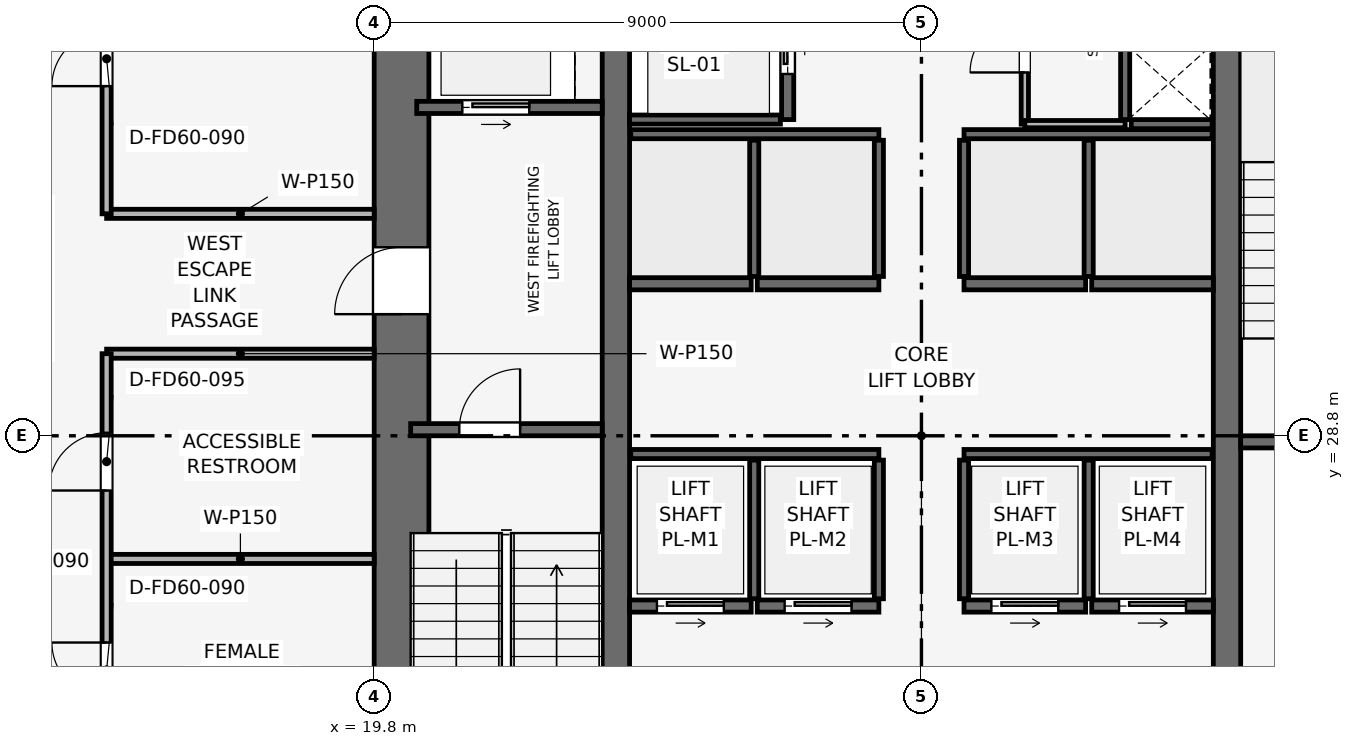
"""IFC4 building model, lengths in metres.
Left out: names, types, materials, properties, quantities, classifications, styles, units other than length and angle.
Written with IfcOpenShell. Run it as: python <this file> out.ifc"""

import sys

from ifc_helpers import new_model, si_unit, direction, frame, frame_2d, origin, place, context, subcontext, project, spatial, rectangle, extrude, element, fill, save


model = new_model("IFC4")
c1 = context("Model", 3, precision=1e-05, world=origin(), true_north=direction((0.0, 1.0)))
c2 = subcontext(c1, "Body", "Model", "MODEL_VIEW")
j1 = project(units=[si_unit("LENGTHUNIT", "METRE"), si_unit("PLANEANGLEUNIT", "RADIAN")], contexts=[c1])
p1 = place(None, origin())
s1 = spatial("IfcSite", under=j1, at=p1, CompositionType="ELEMENT")
p2 = place(p1, origin())
s2 = spatial("IfcBuilding", under=s1, at=p2, CompositionType="ELEMENT")
p3 = place(p2, frame((0.0, 0.0, 160.8)))
s3 = spatial("IfcBuildingStorey", under=s2, at=p3, CompositionType="ELEMENT", Elevation=160.8)
p4 = place(p3, frame((20.25, 20.7, 0.0), z_axis=(0.0, 0.0, 1.0), x_axis=(0.0, 1.0, 0.0)))
e1 = element("IfcWall", 1, at=p4, inside=s3, PredefinedType="SHEAR", context=c2, shape_type="SweptSolid", body=[
    extrude(rectangle(XDim=16.2, YDim=0.9, at=frame_2d((8.1, 0.0))), origin(), (0.0, 0.0, 1.0), 3.75),
])
p5 = place(p4, frame((10.1, 0.0, 0.0)))
e2 = element("IfcOpeningElement", 2, at=p5, cuts=e1, PredefinedType="OPENING", context=c2, shape_type="SweptSolid", body=[
    extrude(rectangle(XDim=1.1, YDim=2.15, at=frame_2d((0.55, 1.075))), frame((0.0, 0.46, 0.0), z_axis=(0.0, -1.0, 0.0), x_axis=(1.0, 0.0, 0.0)), (0.0, 0.0, 1.0), 0.92),
])
for number, where, z_axis, x_axis in (
    (3, (23.775, 20.7, 0.0), (0.0, 0.0, 1.0), (0.0, 1.0, 0.0)),
    (4, (33.825, 20.7, 0.0), (0.0, 0.0, 1.0), (0.0, 1.0, 0.0)),
):
    element("IfcWall", number, at=place(p3, frame(where, z_axis=z_axis, x_axis=x_axis)), inside=s3, PredefinedType="SHEAR", context=c2, shape_type="SweptSolid", body=[
        extrude(rectangle(XDim=16.2, YDim=0.45, at=frame_2d((8.1, 0.0))), origin(), (0.0, 0.0, 1.0), 3.75),
    ])
p6 = place(p3, frame((20.4, 28.9, 0.0), z_axis=(0.0, 0.0, 1.0), x_axis=(1.0, 0.0, 0.0)))
e5 = element("IfcWall", 5, at=p6, inside=s3, PredefinedType="SHEAR", context=c2, shape_type="SweptSolid", body=[
    extrude(rectangle(XDim=3.15, YDim=0.2, at=frame_2d((1.575, 0.0))), origin(), (0.0, 0.0, 1.0), 3.495),
])
p7 = place(p6, frame((0.8, 0.0, 0.0)))
e6 = element("IfcOpeningElement", 6, at=p7, cuts=e5, PredefinedType="OPENING", context=c2, shape_type="SweptSolid", body=[
    extrude(rectangle(XDim=1.0, YDim=2.1, at=frame_2d((0.5, 1.05))), frame((0.0, 0.11, 0.0), z_axis=(0.0, -1.0, 0.0), x_axis=(1.0, 0.0, 0.0)), (0.0, 0.0, 1.0), 0.22),
])
p8 = place(p3, frame((34.05, 28.7, 0.0), z_axis=(0.0, 0.0, 1.0), x_axis=(1.0, 0.0, 0.0)))
e7 = element("IfcWall", 7, at=p8, inside=s3, PredefinedType="SHEAR", context=c2, shape_type="SweptSolid", body=[
    extrude(rectangle(XDim=3.15, YDim=0.2, at=frame_2d((1.575, 0.0))), origin(), (0.0, 0.0, 1.0), 3.495),
])
p9 = place(p8, frame((0.8, 0.0, 0.0)))
e8 = element("IfcOpeningElement", 8, at=p9, cuts=e7, PredefinedType="OPENING", context=c2, shape_type="SweptSolid", body=[
    extrude(rectangle(XDim=1.0, YDim=2.1, at=frame_2d((0.5, 1.05))), frame((0.0, 0.11, 0.0), z_axis=(0.0, -1.0, 0.0), x_axis=(1.0, 0.0, 0.0)), (0.0, 0.0, 1.0), 0.22),
])
p10 = place(p3, frame((32.15, 34.0, 0.0), z_axis=(0.0, 0.0, 1.0), x_axis=(0.0, 1.0, 0.0)))
e9 = element("IfcWall", 9, at=p10, inside=s3, PredefinedType="SHEAR", context=c2, shape_type="SweptSolid", body=[
    extrude(rectangle(XDim=2.9, YDim=0.15, at=frame_2d((1.45, 0.0))), origin(), (0.0, 0.0, 1.0), 3.495),
])
p11 = place(p3, frame((32.25, 33.925, 0.0), z_axis=(0.0, 0.0, 1.0), x_axis=(1.0, 0.0, 0.0)))
e10 = element("IfcWall", 10, at=p11, inside=s3, PredefinedType="SHEAR", context=c2, shape_type="SweptSolid", body=[
    extrude(rectangle(XDim=1.33, YDim=0.15, at=frame_2d((0.665, 0.0))), origin(), (0.0, 0.0, 1.0), 3.495),
])
p12 = place(p3, frame((20.5, 34.2, 0.0), z_axis=(0.0, 0.0, 1.0), x_axis=(1.0, 0.0, 0.0)))
e11 = element("IfcWall", 11, at=p12, inside=s3, PredefinedType="SHEAR", context=c2, shape_type="SweptSolid", body=[
    extrude(rectangle(XDim=3.05, YDim=0.2, at=frame_2d((1.525, 0.0))), origin(), (0.0, 0.0, 1.0), 3.495),
])
p13 = place(p12, frame((0.75, 0.0, 0.0)))
e12 = element("IfcOpeningElement", 12, at=p13, cuts=e11, PredefinedType="OPENING", context=c2, shape_type="SweptSolid", body=[
    extrude(rectangle(XDim=1.1, YDim=2.15, at=frame_2d((0.55, 1.075))), frame((0.0, 0.11, 0.0), z_axis=(0.0, -1.0, 0.0), x_axis=(1.0, 0.0, 0.0)), (0.0, 0.0, 1.0), 0.22),
])
p14 = place(p3, frame((26.6, 34.0, 0.0), z_axis=(0.0, 0.0, 1.0), x_axis=(0.0, 1.0, 0.0)))
e13 = element("IfcWall", 13, at=p14, inside=s3, PredefinedType="SHEAR", context=c2, shape_type="SweptSolid", body=[
    extrude(rectangle(XDim=2.9, YDim=0.2, at=frame_2d((1.45, 0.0))), origin(), (0.0, 0.0, 1.0), 3.495),
])
p15 = place(p14, frame((0.75, 0.0, 0.0)))
e14 = element("IfcOpeningElement", 14, at=p15, cuts=e13, PredefinedType="OPENING", context=c2, shape_type="SweptSolid", body=[
    extrude(rectangle(XDim=1.1, YDim=2.15, at=frame_2d((0.55, 1.075))), frame((0.0, 0.11, 0.0), z_axis=(0.0, -1.0, 0.0), x_axis=(1.0, 0.0, 0.0)), (0.0, 0.0, 1.0), 0.22),
])
p16 = place(p3, frame((24.0, 34.0, 0.0), z_axis=(0.0, 0.0, 1.0), x_axis=(1.0, 0.0, 0.0)))
e15 = element("IfcWall", 15, at=p16, inside=s3, PredefinedType="SHEAR", context=c2, shape_type="SweptSolid", body=[
    extrude(rectangle(XDim=2.48, YDim=0.15, at=frame_2d((1.24, 0.0))), origin(), (0.0, 0.0, 1.0), 3.495),
])
p17 = place(p3, frame((24.0, 26.0, 0.0), z_axis=(0.0, 0.0, 1.0), x_axis=(1.0, 0.0, 0.0)))
e16 = element("IfcWall", 16, at=p17, inside=s3, PredefinedType="SHEAR", context=c2, shape_type="SweptSolid", body=[
    extrude(rectangle(XDim=2.0, YDim=0.2, at=frame_2d((1.0, 0.0))), origin(), (0.0, 0.0, 1.0), 3.495),
])
p18 = place(p17, frame((0.45, 0.0, 0.0)))
e17 = element("IfcOpeningElement", 17, at=p18, cuts=e16, PredefinedType="OPENING", context=c2, shape_type="SweptSolid", body=[
    extrude(rectangle(XDim=1.1, YDim=2.15, at=frame_2d((0.55, 1.075))), frame((0.0, 0.11, 0.0), z_axis=(0.0, -1.0, 0.0), x_axis=(1.0, 0.0, 0.0)), (0.0, 0.0, 1.0), 0.22),
])
p19 = place(p3, frame((26.1, 26.0, 0.0), z_axis=(0.0, 0.0, 1.0), x_axis=(1.0, 0.0, 0.0)))
e18 = element("IfcWall", 18, at=p19, inside=s3, PredefinedType="SHEAR", context=c2, shape_type="SweptSolid", body=[
    extrude(rectangle(XDim=2.0, YDim=0.2, at=frame_2d((1.0, 0.0))), origin(), (0.0, 0.0, 1.0), 3.495),
])
p20 = place(p19, frame((0.45, 0.0, 0.0)))
e19 = element("IfcOpeningElement", 19, at=p20, cuts=e18, PredefinedType="OPENING", context=c2, shape_type="SweptSolid", body=[
    extrude(rectangle(XDim=1.1, YDim=2.15, at=frame_2d((0.55, 1.075))), frame((0.0, 0.11, 0.0), z_axis=(0.0, -1.0, 0.0), x_axis=(1.0, 0.0, 0.0)), (0.0, 0.0, 1.0), 0.22),
])
p21 = place(p3, frame((29.5, 26.0, 0.0), z_axis=(0.0, 0.0, 1.0), x_axis=(1.0, 0.0, 0.0)))
e20 = element("IfcWall", 20, at=p21, inside=s3, PredefinedType="SHEAR", context=c2, shape_type="SweptSolid", body=[
    extrude(rectangle(XDim=2.0, YDim=0.2, at=frame_2d((1.0, 0.0))), origin(), (0.0, 0.0, 1.0), 3.495),
])
p22 = place(p21, frame((0.45, 0.0, 0.0)))
e21 = element("IfcOpeningElement", 21, at=p22, cuts=e20, PredefinedType="OPENING", context=c2, shape_type="SweptSolid", body=[
    extrude(rectangle(XDim=1.1, YDim=2.15, at=frame_2d((0.55, 1.075))), frame((0.0, 0.11, 0.0), z_axis=(0.0, -1.0, 0.0), x_axis=(1.0, 0.0, 0.0)), (0.0, 0.0, 1.0), 0.22),
])
p23 = place(p3, frame((31.6, 26.0, 0.0), z_axis=(0.0, 0.0, 1.0), x_axis=(1.0, 0.0, 0.0)))
e22 = element("IfcWall", 22, at=p23, inside=s3, PredefinedType="SHEAR", context=c2, shape_type="SweptSolid", body=[
    extrude(rectangle(XDim=2.0, YDim=0.2, at=frame_2d((1.0, 0.0))), origin(), (0.0, 0.0, 1.0), 3.495),
])
p24 = place(p23, frame((0.45, 0.0, 0.0)))
e23 = element("IfcOpeningElement", 23, at=p24, cuts=e22, PredefinedType="OPENING", context=c2, shape_type="SweptSolid", body=[
    extrude(rectangle(XDim=1.1, YDim=2.15, at=frame_2d((0.55, 1.075))), frame((0.0, 0.11, 0.0), z_axis=(0.0, -1.0, 0.0), x_axis=(1.0, 0.0, 0.0)), (0.0, 0.0, 1.0), 0.22),
])
for number, where, z_axis, x_axis in (
    (24, (24.0, 31.3, 0.0), (0.0, 0.0, 1.0), (1.0, 0.0, 0.0)),
    (25, (26.1, 31.3, 0.0), (0.0, 0.0, 1.0), (1.0, 0.0, 0.0)),
    (26, (29.5, 31.3, 0.0), (0.0, 0.0, 1.0), (1.0, 0.0, 0.0)),
    (27, (31.6, 31.3, 0.0), (0.0, 0.0, 1.0), (1.0, 0.0, 0.0)),
):
    element("IfcWall", number, at=place(p3, frame(where, z_axis=z_axis, x_axis=x_axis)), inside=s3, PredefinedType="SHEAR", context=c2, shape_type="SweptSolid", body=[
        extrude(rectangle(XDim=2.0, YDim=0.2, at=frame_2d((1.0, 0.0))), origin(), (0.0, 0.0, 1.0), 3.495),
    ])
for number, where, z_axis, x_axis in (
    (28, (24.02, 28.5, 0.0), (0.0, 0.0, 1.0), (1.0, 0.0, 0.0)),
    (29, (29.5, 28.5, 0.0), (0.0, 0.0, 1.0), (1.0, 0.0, 0.0)),
):
    element("IfcWall", number, at=place(p3, frame(where, z_axis=z_axis, x_axis=x_axis)), inside=s3, PredefinedType="SHEAR", context=c2, shape_type="SweptSolid", body=[
        extrude(rectangle(XDim=4.08, YDim=0.15, at=frame_2d((2.04, 0.0))), origin(), (0.0, 0.0, 1.0), 3.495),
    ])
for number, where, z_axis, x_axis in (
    (30, (26.05, 26.12, 0.0), (0.0, 0.0, 1.0), (0.0, 1.0, 0.0)),
    (31, (28.1, 26.12, 0.0), (0.0, 0.0, 1.0), (0.0, 1.0, 0.0)),
    (32, (29.5, 26.12, 0.0), (0.0, 0.0, 1.0), (0.0, 1.0, 0.0)),
    (33, (31.55, 26.12, 0.0), (0.0, 0.0, 1.0), (0.0, 1.0, 0.0)),
):
    element("IfcWall", number, at=place(p3, frame(where, z_axis=z_axis, x_axis=x_axis)), inside=s3, PredefinedType="SHEAR", context=c2, shape_type="SweptSolid", body=[
        extrude(rectangle(XDim=2.28, YDim=0.15, at=frame_2d((1.14, 0.0))), origin(), (0.0, 0.0, 1.0), 3.495),
    ])
for number, where, z_axis, x_axis in (
    (34, (24.02, 33.76, 0.0), (0.0, 0.0, 1.0), (1.0, 0.0, 0.0)),
    (35, (29.5, 33.76, 0.0), (0.0, 0.0, 1.0), (1.0, 0.0, 0.0)),
):
    element("IfcWall", number, at=place(p3, frame(where, z_axis=z_axis, x_axis=x_axis)), inside=s3, PredefinedType="SHEAR", context=c2, shape_type="SweptSolid", body=[
        extrude(rectangle(XDim=4.08, YDim=0.15, at=frame_2d((2.04, 0.0))), origin(), (0.0, 0.0, 1.0), 3.495),
    ])
for number, where, z_axis, x_axis in (
    (36, (26.05, 31.42, 0.0), (0.0, 0.0, 1.0), (0.0, 1.0, 0.0)),
    (37, (28.1, 31.42, 0.0), (0.0, 0.0, 1.0), (0.0, 1.0, 0.0)),
    (38, (29.5, 31.42, 0.0), (0.0, 0.0, 1.0), (0.0, 1.0, 0.0)),
    (39, (31.55, 31.42, 0.0), (0.0, 0.0, 1.0), (0.0, 1.0, 0.0)),
):
    element("IfcWall", number, at=place(p3, frame(where, z_axis=z_axis, x_axis=x_axis)), inside=s3, PredefinedType="SHEAR", context=c2, shape_type="SweptSolid", body=[
        extrude(rectangle(XDim=2.24, YDim=0.15, at=frame_2d((1.12, 0.0))), origin(), (0.0, 0.0, 1.0), 3.495),
    ])
p25 = place(p3, frame((30.5, 33.925, 0.0), z_axis=(0.0, 0.0, 1.0), x_axis=(0.0, 1.0, 0.0)))
e40 = element("IfcWall", 40, at=p25, inside=s3, PredefinedType="PARTITIONING", context=c2, shape_type="SweptSolid", body=[
    extrude(rectangle(XDim=2.975, YDim=0.12, at=frame_2d((1.487, 0.0))), origin(), (0.0, 0.0, 1.0), 3.495),
])
p26 = place(p25, frame((0.85, 0.0, 0.0)))
e41 = element("IfcOpeningElement", 41, at=p26, cuts=e40, PredefinedType="OPENING", context=c2, shape_type="SweptSolid", body=[
    extrude(rectangle(XDim=0.9, YDim=2.1, at=frame_2d((0.45, 1.05))), frame((0.0, 0.07, 0.0), z_axis=(0.0, -1.0, 0.0), x_axis=(1.0, 0.0, 0.0)), (0.0, 0.0, 1.0), 0.14),
])
p27 = place(p3, frame((30.5, 33.925, 0.0), z_axis=(0.0, 0.0, 1.0), x_axis=(1.0, 0.0, 0.0)))
e42 = element("IfcWall", 42, at=p27, inside=s3, PredefinedType="PARTITIONING", context=c2, shape_type="SweptSolid", body=[
    extrude(rectangle(XDim=1.65, YDim=0.12, at=frame_2d((0.825, 0.0))), origin(), (0.0, 0.0, 1.0), 3.495),
])
for number, where, z_axis, x_axis in (
    (43, (15.4, 26.775, 0.0), (0.0, 0.0, 1.0), (1.0, 0.0, 0.0)),
    (44, (15.4, 30.15, 0.0), (0.0, 0.0, 1.0), (1.0, 0.0, 0.0)),
    (45, (15.4, 32.45, 0.0), (0.0, 0.0, 1.0), (1.0, 0.0, 0.0)),
):
    element("IfcWall", number, at=place(p3, frame(where, z_axis=z_axis, x_axis=x_axis)), inside=s3, PredefinedType="PARTITIONING", context=c2, shape_type="SweptSolid", body=[
        extrude(rectangle(XDim=4.4, YDim=0.15, at=frame_2d((2.2, 0.0))), origin(), (0.0, 0.0, 1.0), 3.495),
    ])
p28 = place(p3, frame((15.4, 19.8, 0.0), z_axis=(0.0, 0.0, 1.0), x_axis=(0.0, 1.0, 0.0)))
e46 = element("IfcWall", 46, at=p28, inside=s3, PredefinedType="PARTITIONING", context=c2, shape_type="SweptSolid", body=[
    extrude(rectangle(XDim=10.35, YDim=0.15, at=frame_2d((5.175, 0.0))), origin(), (0.0, 0.0, 1.0), 3.03),
])
p29 = place(p28, frame((1.2, 0.0, 0.0)))
e47 = element("IfcOpeningElement", 47, at=p29, cuts=e46, PredefinedType="OPENING", context=c2, shape_type="SweptSolid", body=[
    extrude(rectangle(XDim=0.9, YDim=2.1, at=frame_2d((0.45, 1.05))), frame((0.0, 0.085, 0.0), z_axis=(0.0, -1.0, 0.0), x_axis=(1.0, 0.0, 0.0)), (0.0, 0.0, 1.0), 0.17),
])
p30 = place(p28, frame((4.7, 0.0, 0.0)))
e48 = element("IfcOpeningElement", 48, at=p30, cuts=e46, PredefinedType="OPENING", context=c2, shape_type="SweptSolid", body=[
    extrude(rectangle(XDim=0.9, YDim=2.1, at=frame_2d((0.45, 1.05))), frame((0.0, 0.085, 0.0), z_axis=(0.0, -1.0, 0.0), x_axis=(1.0, 0.0, 0.0)), (0.0, 0.0, 1.0), 0.17),
])
p31 = place(p28, frame((8.1, 0.0, 0.0)))
e49 = element("IfcOpeningElement", 49, at=p31, cuts=e46, PredefinedType="OPENING", context=c2, shape_type="SweptSolid", body=[
    extrude(rectangle(XDim=0.95, YDim=2.1, at=frame_2d((0.475, 1.05))), frame((0.0, 0.085, 0.0), z_axis=(0.0, -1.0, 0.0), x_axis=(1.0, 0.0, 0.0)), (0.0, 0.0, 1.0), 0.17),
])
p32 = place(p3, frame((15.4, 32.45, 0.0), z_axis=(0.0, 0.0, 1.0), x_axis=(0.0, 1.0, 0.0)))
e50 = element("IfcWall", 50, at=p32, inside=s3, PredefinedType="PARTITIONING", context=c2, shape_type="SweptSolid", body=[
    extrude(rectangle(XDim=5.35, YDim=0.15, at=frame_2d((2.675, 0.0))), origin(), (0.0, 0.0, 1.0), 3.03),
])
p33 = place(p32, frame((2.1, 0.0, 0.0)))
e51 = element("IfcOpeningElement", 51, at=p33, cuts=e50, PredefinedType="OPENING", context=c2, shape_type="SweptSolid", body=[
    extrude(rectangle(XDim=0.9, YDim=2.1, at=frame_2d((0.45, 1.05))), frame((0.0, 0.085, 0.0), z_axis=(0.0, -1.0, 0.0), x_axis=(1.0, 0.0, 0.0)), (0.0, 0.0, 1.0), 0.17),
])
p34 = place(p7, origin())
e52 = element("IfcDoor", 52, at=p34, inside=s3, OperationType="SINGLE_SWING_RIGHT", PredefinedType="DOOR", context=c2, shape_type="SweptSolid", body=[
    extrude(rectangle(XDim=1.0, YDim=2.1, at=frame_2d((0.5, 1.05))), frame((0.0, 0.025, 0.0), z_axis=(0.0, -1.0, 0.0), x_axis=(1.0, 0.0, 0.0)), (0.0, 0.0, 1.0), 0.05),
])
fill(e6, e52)
p35 = place(p13, origin())
e53 = element("IfcDoor", 53, at=p35, inside=s3, OperationType="SLIDING_TO_RIGHT", PredefinedType="DOOR", context=c2, shape_type="SweptSolid", body=[
    extrude(rectangle(XDim=1.1, YDim=2.15, at=frame_2d((0.55, 1.075))), frame((0.0, 0.025, 0.0), z_axis=(0.0, -1.0, 0.0), x_axis=(1.0, 0.0, 0.0)), (0.0, 0.0, 1.0), 0.05),
])
fill(e12, e53)
p36 = place(p15, origin())
e54 = element("IfcDoor", 54, at=p36, inside=s3, OperationType="SLIDING_TO_RIGHT", PredefinedType="DOOR", context=c2, shape_type="SweptSolid", body=[
    extrude(rectangle(XDim=1.1, YDim=2.15, at=frame_2d((0.55, 1.075))), frame((0.0, 0.025, 0.0), z_axis=(0.0, -1.0, 0.0), x_axis=(1.0, 0.0, 0.0)), (0.0, 0.0, 1.0), 0.05),
])
fill(e14, e54)
p37 = place(p18, origin())
e55 = element("IfcDoor", 55, at=p37, inside=s3, OperationType="SLIDING_TO_RIGHT", PredefinedType="DOOR", context=c2, shape_type="SweptSolid", body=[
    extrude(rectangle(XDim=1.1, YDim=2.15, at=frame_2d((0.55, 1.075))), frame((0.0, 0.025, 0.0), z_axis=(0.0, -1.0, 0.0), x_axis=(1.0, 0.0, 0.0)), (0.0, 0.0, 1.0), 0.05),
])
fill(e17, e55)
p38 = place(p20, origin())
e56 = element("IfcDoor", 56, at=p38, inside=s3, OperationType="SLIDING_TO_RIGHT", PredefinedType="DOOR", context=c2, shape_type="SweptSolid", body=[
    extrude(rectangle(XDim=1.1, YDim=2.15, at=frame_2d((0.55, 1.075))), frame((0.0, 0.025, 0.0), z_axis=(0.0, -1.0, 0.0), x_axis=(1.0, 0.0, 0.0)), (0.0, 0.0, 1.0), 0.05),
])
fill(e19, e56)
p39 = place(p22, origin())
e57 = element("IfcDoor", 57, at=p39, inside=s3, OperationType="SLIDING_TO_RIGHT", PredefinedType="DOOR", context=c2, shape_type="SweptSolid", body=[
    extrude(rectangle(XDim=1.1, YDim=2.15, at=frame_2d((0.55, 1.075))), frame((0.0, 0.025, 0.0), z_axis=(0.0, -1.0, 0.0), x_axis=(1.0, 0.0, 0.0)), (0.0, 0.0, 1.0), 0.05),
])
fill(e21, e57)
p40 = place(p24, origin())
e58 = element("IfcDoor", 58, at=p40, inside=s3, OperationType="SLIDING_TO_RIGHT", PredefinedType="DOOR", context=c2, shape_type="SweptSolid", body=[
    extrude(rectangle(XDim=1.1, YDim=2.15, at=frame_2d((0.55, 1.075))), frame((0.0, 0.025, 0.0), z_axis=(0.0, -1.0, 0.0), x_axis=(1.0, 0.0, 0.0)), (0.0, 0.0, 1.0), 0.05),
])
fill(e23, e58)
p41 = place(p26, origin())
e59 = element("IfcDoor", 59, at=p41, inside=s3, OperationType="SINGLE_SWING_LEFT", PredefinedType="DOOR", context=c2, shape_type="SweptSolid", body=[
    extrude(rectangle(XDim=0.9, YDim=2.1, at=frame_2d((0.45, 1.05))), frame((0.0, 0.025, 0.0), z_axis=(0.0, -1.0, 0.0), x_axis=(1.0, 0.0, 0.0)), (0.0, 0.0, 1.0), 0.05),
])
fill(e41, e59)
p42 = place(p30, origin())
e60 = element("IfcDoor", 60, at=p42, inside=s3, OperationType="SINGLE_SWING_RIGHT", PredefinedType="DOOR", context=c2, shape_type="SweptSolid", body=[
    extrude(rectangle(XDim=0.9, YDim=2.1, at=frame_2d((0.45, 1.05))), frame((0.0, 0.025, 0.0), z_axis=(0.0, -1.0, 0.0), x_axis=(1.0, 0.0, 0.0)), (0.0, 0.0, 1.0), 0.05),
])
fill(e48, e60)
p43 = place(p31, origin())
e61 = element("IfcDoor", 61, at=p43, inside=s3, OperationType="SINGLE_SWING_LEFT", PredefinedType="DOOR", context=c2, shape_type="SweptSolid", body=[
    extrude(rectangle(XDim=0.95, YDim=2.1, at=frame_2d((0.475, 1.05))), frame((0.0, 0.025, 0.0), z_axis=(0.0, -1.0, 0.0), x_axis=(1.0, 0.0, 0.0)), (0.0, 0.0, 1.0), 0.05),
])
fill(e49, e61)
p44 = place(p33, origin())
e62 = element("IfcDoor", 62, at=p44, inside=s3, OperationType="SINGLE_SWING_LEFT", PredefinedType="DOOR", context=c2, shape_type="SweptSolid", body=[
    extrude(rectangle(XDim=0.9, YDim=2.1, at=frame_2d((0.45, 1.05))), frame((0.0, 0.025, 0.0), z_axis=(0.0, -1.0, 0.0), x_axis=(1.0, 0.0, 0.0)), (0.0, 0.0, 1.0), 0.05),
])
fill(e51, e62)
p45 = place(p5, origin())
e63 = element("IfcDoor", 63, at=p45, inside=s3, OperationType="SINGLE_SWING_LEFT", PredefinedType="DOOR", context=c2, shape_type="SweptSolid", body=[
    extrude(rectangle(XDim=1.1, YDim=2.15, at=frame_2d((0.55, 1.075))), frame((0.0, 0.025, 0.0), z_axis=(0.0, -1.0, 0.0), x_axis=(1.0, 0.0, 0.0)), (0.0, 0.0, 1.0), 0.05),
])
fill(e2, e63)
save(model, sys.argv[1])
